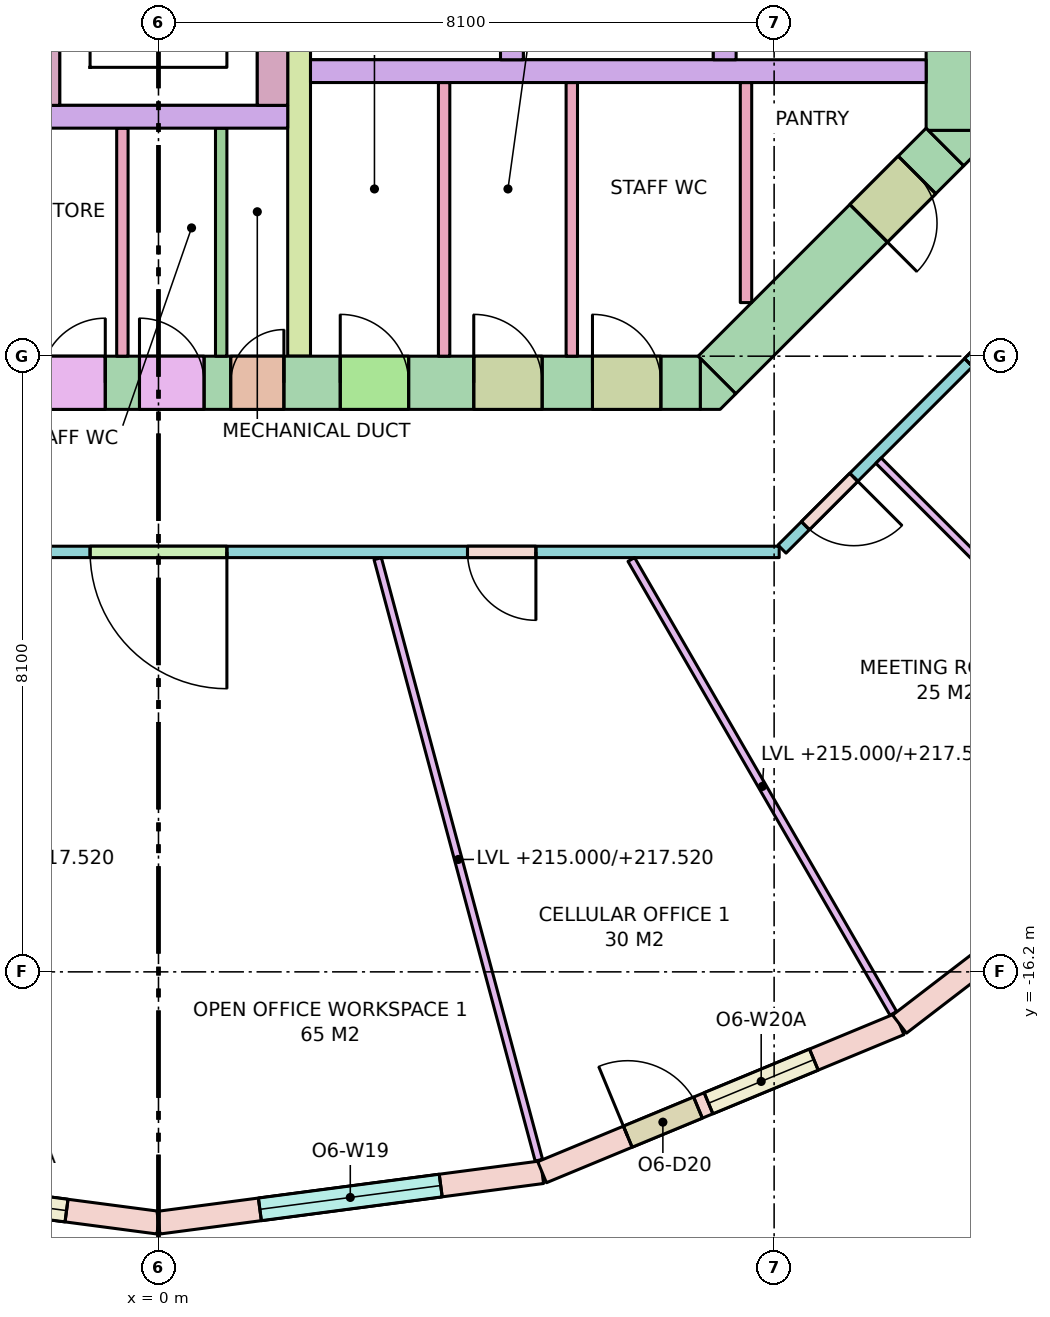
"""IFC4 building model, lengths in metres.
Left out: names, types, materials, properties, quantities, classifications, styles, units other than length and angle.
Written with IfcOpenShell. Run it as: python <this file> out.ifc"""

import sys

from ifc_helpers import new_model, si_unit, direction, frame, frame_2d, origin, place, context, subcontext, project, spatial, polyline, rectangle, outline, extrude, element, fill, save


model = new_model("IFC4")
c1 = context("Model", 3, precision=1e-05, world=origin(), true_north=direction((0.0, 1.0)))
c2 = subcontext(c1, "Body", "Model", "MODEL_VIEW")
j1 = project(units=[si_unit("LENGTHUNIT", "METRE"), si_unit("PLANEANGLEUNIT", "RADIAN")], contexts=[c1])
p1 = place(None, origin())
s1 = spatial("IfcSite", under=j1, at=p1, CompositionType="ELEMENT")
p2 = place(p1, origin())
s2 = spatial("IfcBuilding", under=s1, at=p2, CompositionType="ELEMENT")
p3 = place(p2, frame((0.0, 0.0, 215.0)))
s3 = spatial("IfcBuildingStorey", under=s2, at=p3, CompositionType="ELEMENT", Elevation=215.0)
p4 = place(p3, frame((-7.13, -8.45, -0.28), z_axis=(0.0, 0.0, 1.0), x_axis=(1.0, 0.0, 0.0)))
e1 = element("IfcWall", 1, at=p4, inside=s3, PredefinedType="SHEAR", context=c2, shape_type="SweptSolid", body=[
    extrude(rectangle(XDim=14.26, YDim=0.7, at=frame_2d((7.13, 0.0))), origin(), (0.0, 0.0, 1.0), 3.7),
])
p5 = place(p4, frame((8.08, 0.0, 0.28)))
e2 = element("IfcOpeningElement", 2, at=p5, cuts=e1, PredefinedType="OPENING", context=c2, shape_type="SweptSolid", body=[
    extrude(rectangle(XDim=0.7, YDim=2.1, at=frame_2d((0.35, 1.05))), frame((0.0, 0.36, 0.0), z_axis=(0.0, -1.0, 0.0), x_axis=(1.0, 0.0, 0.0)), (0.0, 0.0, 1.0), 0.72),
])
p6 = place(p4, frame((5.58, 0.0, 0.28)))
e3 = element("IfcOpeningElement", 3, at=p6, cuts=e1, PredefinedType="OPENING", context=c2, shape_type="SweptSolid", body=[
    extrude(rectangle(XDim=0.85, YDim=2.1, at=frame_2d((0.425, 1.05))), frame((0.0, 0.36, 0.0), z_axis=(0.0, -1.0, 0.0), x_axis=(1.0, 0.0, 0.0)), (0.0, 0.0, 1.0), 0.72),
])
p7 = place(p4, frame((6.88, 0.0, 0.28)))
e4 = element("IfcOpeningElement", 4, at=p7, cuts=e1, PredefinedType="OPENING", context=c2, shape_type="SweptSolid", body=[
    extrude(rectangle(XDim=0.85, YDim=2.1, at=frame_2d((0.425, 1.05))), frame((0.0, 0.36, 0.0), z_axis=(0.0, -1.0, 0.0), x_axis=(1.0, 0.0, 0.0)), (0.0, 0.0, 1.0), 0.72),
])
p8 = place(p4, frame((9.521, 0.0, 0.28)))
e5 = element("IfcOpeningElement", 5, at=p8, cuts=e1, PredefinedType="OPENING", context=c2, shape_type="SweptSolid", body=[
    extrude(rectangle(XDim=0.9, YDim=2.1, at=frame_2d((0.45, 1.05))), frame((0.0, 0.36, 0.0), z_axis=(0.0, -1.0, 0.0), x_axis=(1.0, 0.0, 0.0)), (0.0, 0.0, 1.0), 0.72),
])
p9 = place(p4, frame((11.278, 0.0, 0.28)))
e6 = element("IfcOpeningElement", 6, at=p9, cuts=e1, PredefinedType="OPENING", context=c2, shape_type="SweptSolid", body=[
    extrude(rectangle(XDim=0.9, YDim=2.1, at=frame_2d((0.45, 1.05))), frame((0.0, 0.36, 0.0), z_axis=(0.0, -1.0, 0.0), x_axis=(1.0, 0.0, 0.0)), (0.0, 0.0, 1.0), 0.72),
])
p10 = place(p4, frame((12.84, 0.0, 0.28)))
e7 = element("IfcOpeningElement", 7, at=p10, cuts=e1, PredefinedType="OPENING", context=c2, shape_type="SweptSolid", body=[
    extrude(rectangle(XDim=0.9, YDim=2.1, at=frame_2d((0.45, 1.05))), frame((0.0, 0.36, 0.0), z_axis=(0.0, -1.0, 0.0), x_axis=(1.0, 0.0, 0.0)), (0.0, 0.0, 1.0), 0.72),
])
p11 = place(p3, frame((10.45, -5.13, -0.28), z_axis=(0.0, 0.0, 1.0), x_axis=(0.0, 1.0, 0.0)))
e8 = element("IfcWall", 8, at=p11, inside=s3, PredefinedType="SHEAR", context=c2, shape_type="SweptSolid", body=[
    extrude(rectangle(XDim=10.26, YDim=0.7, at=frame_2d((5.13, 0.0))), origin(), (0.0, 0.0, 1.0), 3.7),
])
p12 = place(p11, frame((4.13, 0.0, 0.28)))
e9 = element("IfcOpeningElement", 9, at=p12, cuts=e8, PredefinedType="OPENING", context=c2, shape_type="SweptSolid", body=[
    extrude(rectangle(XDim=2.0, YDim=2.1, at=frame_2d((1.0, 1.05))), frame((0.0, 0.36, 0.0), z_axis=(0.0, -1.0, 0.0), x_axis=(1.0, 0.0, 0.0)), (0.0, 0.0, 1.0), 0.72),
])
p13 = place(p3, frame((10.347, -5.347, -0.28), z_axis=(0.0, 0.0, 1.0), x_axis=(-0.707106781187, -0.707106781187, 0.0)))
e10 = element("IfcWall", 10, at=p13, inside=s3, PredefinedType="SHEAR", context=c2, shape_type="SweptSolid", body=[
    extrude(rectangle(XDim=4.243, YDim=0.7, at=frame_2d((2.121, 0.0))), origin(), (0.0, 0.0, 1.0), 3.7),
])
p14 = place(p13, frame((0.52, 0.0, 0.28)))
e11 = element("IfcOpeningElement", 11, at=p14, cuts=e10, PredefinedType="OPENING", context=c2, shape_type="SweptSolid", body=[
    extrude(rectangle(XDim=0.9, YDim=2.1, at=frame_2d((0.45, 1.05))), frame((0.0, 0.36, 0.0), z_axis=(0.0, -1.0, 0.0), x_axis=(1.0, 0.0, 0.0)), (0.0, 0.0, 1.0), 0.72),
])
p15 = place(p3, frame((0.0, 0.0, -0.28)))
e12 = element("IfcWall", 12, at=p15, inside=s3, PredefinedType="SHEAR", context=c2, shape_type="SweptSolid", body=[
    extrude(outline(polyline([(7.39, -8.8), (7.13, -8.8), (7.13, -8.8), (7.13, -8.13), (7.595, -8.595), (7.595, -8.595), (7.595, -8.595), (7.39, -8.8)])), origin(), (0.0, 0.0, 1.0), 3.7),
])
p16 = place(p3, frame((0.0, 0.0, -0.28)))
e13 = element("IfcWall", 13, at=p16, inside=s3, PredefinedType="SHEAR", context=c2, shape_type="SweptSolid", body=[
    extrude(outline(polyline([(10.8, -5.39), (10.595, -5.595), (10.595, -5.595), (10.595, -5.595), (10.13, -5.13), (10.8, -5.13), (10.8, -5.13), (10.8, -5.39)])), origin(), (0.0, 0.0, 1.0), 3.7),
])
p17 = place(p3, frame((2.0, -4.35, 0.0), z_axis=(0.0, 0.0, 1.0), x_axis=(1.0, 0.0, 0.0)))
e14 = element("IfcWall", 14, at=p17, inside=s3, PredefinedType="SOLIDWALL", context=c2, shape_type="SweptSolid", body=[
    extrude(rectangle(XDim=8.1, YDim=0.3, at=frame_2d((4.05, 0.0))), origin(), (0.0, 0.0, 1.0), 3.42),
])
for number, where, z_axis, x_axis in (
    (15, (4.65, -4.2, 0.0), (0.0, 0.0, 1.0), (0.0, 1.0, 0.0)),
    (16, (7.45, -4.2, 0.0), (0.0, 0.0, 1.0), (0.0, 1.0, 0.0)),
):
    element("IfcWall", number, at=place(p3, frame(where, z_axis=z_axis, x_axis=x_axis)), inside=s3, PredefinedType="SOLIDWALL", context=c2, shape_type="SweptSolid", body=[
        extrude(rectangle(XDim=2.4, YDim=0.3, at=frame_2d((1.2, 0.0))), origin(), (0.0, 0.0, 1.0), 3.42),
    ])
p18 = place(p3, frame((1.85, -8.1, 0.0), z_axis=(0.0, 0.0, 1.0), x_axis=(0.0, 1.0, 0.0)))
e17 = element("IfcWall", 17, at=p18, inside=s3, PredefinedType="SHEAR", context=c2, shape_type="SweptSolid", body=[
    extrude(rectangle(XDim=6.6, YDim=0.3, at=frame_2d((3.3, 0.0))), origin(), (0.0, 0.0, 1.0), 3.42),
])
for number, where, z_axis, x_axis in (
    (18, (-1.5, -4.8, 0.0), (0.0, 0.0, 1.0), (0.0, 1.0, 0.0)),
    (19, (1.5, -4.8, 0.0), (0.0, 0.0, 1.0), (0.0, 1.0, 0.0)),
):
    element("IfcWall", number, at=place(p3, frame(where, z_axis=z_axis, x_axis=x_axis)), inside=s3, PredefinedType="SOLIDWALL", context=c2, shape_type="SweptSolid", body=[
        extrude(rectangle(XDim=3.0, YDim=0.4, at=frame_2d((1.5, 0.0))), origin(), (0.0, 0.0, 1.0), 3.42),
    ])
p19 = place(p3, frame((-1.7, -4.95, 0.0), z_axis=(0.0, 0.0, 1.0), x_axis=(1.0, 0.0, 0.0)))
e20 = element("IfcWall", 20, at=p19, inside=s3, PredefinedType="SOLIDWALL", context=c2, shape_type="SweptSolid", body=[
    extrude(rectangle(XDim=3.4, YDim=0.3, at=frame_2d((1.7, 0.0))), origin(), (0.0, 0.0, 1.0), 3.42),
])
p20 = place(p3, frame((-5.047, -18.836, 0.0), z_axis=(0.0, 0.0, 1.0), x_axis=(0.99144890792, -0.130495451964, 0.0)))
e21 = element("IfcWall", 21, at=p20, inside=s3, PredefinedType="STANDARD", context=c2, shape_type="SweptSolid", body=[
    extrude(rectangle(XDim=5.091, YDim=0.3, at=frame_2d((2.545, 0.0))), origin(), (0.0, 0.0, 1.0), 3.42),
])
p21 = place(p20, frame((1.22, 0.0, 0.0)))
e22 = element("IfcOpeningElement", 22, at=p21, cuts=e21, PredefinedType="OPENING", context=c2, shape_type="SweptSolid", body=[
    extrude(rectangle(XDim=1.0, YDim=2.4, at=frame_2d((0.5, 1.2))), frame((0.0, 0.16, 0.0), z_axis=(0.0, -1.0, 0.0), x_axis=(1.0, 0.0, 0.0)), (0.0, 0.0, 1.0), 0.32),
])
p22 = place(p20, frame((2.37, 0.0, 0.8)))
e23 = element("IfcOpeningElement", 23, at=p22, cuts=e21, PredefinedType="OPENING", context=c2, shape_type="SweptSolid", body=[
    extrude(rectangle(XDim=1.5, YDim=2.4, at=frame_2d((0.75, 1.2))), frame((0.0, 0.16, 0.0), z_axis=(0.0, -1.0, 0.0), x_axis=(1.0, 0.0, 0.0)), (0.0, 0.0, 1.0), 0.32),
])
p23 = place(p3, frame((0.0, -19.5, 0.0), z_axis=(0.0, 0.0, 1.0), x_axis=(0.99144890792, 0.130495451964, 0.0)))
e24 = element("IfcWall", 24, at=p23, inside=s3, PredefinedType="STANDARD", context=c2, shape_type="SweptSolid", body=[
    extrude(rectangle(XDim=5.091, YDim=0.3, at=frame_2d((2.545, 0.0))), origin(), (0.0, 0.0, 1.0), 3.42),
])
p24 = place(p23, frame((1.345, 0.0, 0.8)))
e25 = element("IfcOpeningElement", 25, at=p24, cuts=e24, PredefinedType="OPENING", context=c2, shape_type="SweptSolid", body=[
    extrude(rectangle(XDim=2.4, YDim=2.4, at=frame_2d((1.2, 1.2))), frame((0.0, 0.16, 0.0), z_axis=(0.0, -1.0, 0.0), x_axis=(1.0, 0.0, 0.0)), (0.0, 0.0, 1.0), 0.32),
])
p25 = place(p3, frame((5.047, -18.836, 0.0), z_axis=(0.0, 0.0, 1.0), x_axis=(0.923862504675, 0.382724538613, 0.0)))
e26 = element("IfcWall", 26, at=p25, inside=s3, PredefinedType="STANDARD", context=c2, shape_type="SweptSolid", body=[
    extrude(rectangle(XDim=5.091, YDim=0.3, at=frame_2d((2.545, 0.0))), origin(), (0.0, 0.0, 1.0), 3.42),
])
p26 = place(p25, frame((1.22, 0.0, 0.0)))
e27 = element("IfcOpeningElement", 27, at=p26, cuts=e26, PredefinedType="OPENING", context=c2, shape_type="SweptSolid", body=[
    extrude(rectangle(XDim=1.0, YDim=2.4, at=frame_2d((0.5, 1.2))), frame((0.0, 0.16, 0.0), z_axis=(0.0, -1.0, 0.0), x_axis=(1.0, 0.0, 0.0)), (0.0, 0.0, 1.0), 0.32),
])
p27 = place(p25, frame((2.37, 0.0, 0.8)))
e28 = element("IfcOpeningElement", 28, at=p27, cuts=e26, PredefinedType="OPENING", context=c2, shape_type="SweptSolid", body=[
    extrude(rectangle(XDim=1.5, YDim=2.4, at=frame_2d((0.75, 1.2))), frame((0.0, 0.16, 0.0), z_axis=(0.0, -1.0, 0.0), x_axis=(1.0, 0.0, 0.0)), (0.0, 0.0, 1.0), 0.32),
])
p28 = place(p3, frame((9.75, -16.887, 0.0), z_axis=(0.0, 0.0, 1.0), x_axis=(0.79335619014, 0.608757714995, 0.0)))
e29 = element("IfcWall", 29, at=p28, inside=s3, PredefinedType="STANDARD", context=c2, shape_type="SweptSolid", body=[
    extrude(rectangle(XDim=5.091, YDim=0.3, at=frame_2d((2.545, 0.0))), origin(), (0.0, 0.0, 1.0), 3.42),
])
p29 = place(p28, frame((1.345, 0.0, 0.8)))
e30 = element("IfcOpeningElement", 30, at=p29, cuts=e29, PredefinedType="OPENING", context=c2, shape_type="SweptSolid", body=[
    extrude(rectangle(XDim=2.4, YDim=2.4, at=frame_2d((1.2, 1.2))), frame((0.0, 0.16, 0.0), z_axis=(0.0, -1.0, 0.0), x_axis=(1.0, 0.0, 0.0)), (0.0, 0.0, 1.0), 0.32),
])
for number, where, z_axis, x_axis in (
    (31, (0.825, -8.1, 0.0), (0.0, 0.0, 1.0), (0.0, 1.0, 0.0)),
    (32, (-0.475, -8.1, 0.0), (0.0, 0.0, 1.0), (0.0, 1.0, 0.0)),
):
    element("IfcWall", number, at=place(p3, frame(where, z_axis=z_axis, x_axis=x_axis)), inside=s3, PredefinedType="PARTITIONING", context=c2, shape_type="SweptSolid", body=[
        extrude(rectangle(XDim=3.0, YDim=0.15, at=frame_2d((1.5, 0.0))), origin(), (0.0, 0.0, 1.0), 3.42),
    ])
for number, where, z_axis, x_axis in (
    (33, (3.758, -8.1, 0.0), (0.0, 0.0, 1.0), (0.0, 1.0, 0.0)),
    (34, (5.438, -8.1, 0.0), (0.0, 0.0, 1.0), (0.0, 1.0, 0.0)),
):
    element("IfcWall", number, at=place(p3, frame(where, z_axis=z_axis, x_axis=x_axis)), inside=s3, PredefinedType="PARTITIONING", context=c2, shape_type="SweptSolid", body=[
        extrude(rectangle(XDim=3.6, YDim=0.15, at=frame_2d((1.8, 0.0))), origin(), (0.0, 0.0, 1.0), 3.42),
    ])
p30 = place(p3, frame((7.73, -7.395, 0.0), z_axis=(0.0, 0.0, 1.0), x_axis=(0.0, 1.0, 0.0)))
e35 = element("IfcWall", 35, at=p30, inside=s3, PredefinedType="PARTITIONING", context=c2, shape_type="SweptSolid", body=[
    extrude(rectangle(XDim=2.895, YDim=0.15, at=frame_2d((1.448, 0.0))), origin(), (0.0, 0.0, 1.0), 3.42),
])
p31 = place(p3, frame((12.638, -6.204, 0.0), z_axis=(0.0, 0.0, 1.0), x_axis=(-0.707106781187, -0.707106781187, 0.0)))
e36 = element("IfcWall", 36, at=p31, inside=s3, PredefinedType="PARTITIONING", context=c2, shape_type="SweptSolid", body=[
    extrude(rectangle(XDim=6.271, YDim=0.15, at=frame_2d((3.135, 0.0))), origin(), (0.0, 0.0, 1.0), 2.52),
])
p32 = place(p31, frame((4.935, 0.0, 0.0)))
e37 = element("IfcOpeningElement", 37, at=p32, cuts=e36, PredefinedType="OPENING", context=c2, shape_type="SweptSolid", body=[
    extrude(rectangle(XDim=0.9, YDim=2.1, at=frame_2d((0.45, 1.05))), frame((0.0, 0.085, 0.0), z_axis=(0.0, -1.0, 0.0), x_axis=(1.0, 0.0, 0.0)), (0.0, 0.0, 1.0), 0.17),
])
p33 = place(p31, frame((1.8, 0.0, 0.0)))
e38 = element("IfcOpeningElement", 38, at=p33, cuts=e36, PredefinedType="OPENING", context=c2, shape_type="SweptSolid", body=[
    extrude(rectangle(XDim=1.0, YDim=2.1, at=frame_2d((0.5, 1.05))), frame((0.0, 0.085, 0.0), z_axis=(0.0, -1.0, 0.0), x_axis=(1.0, 0.0, 0.0)), (0.0, 0.0, 1.0), 0.17),
])
p34 = place(p3, frame((8.167, -10.675, 0.0), z_axis=(0.0, 0.0, 1.0), x_axis=(-1.0, 0.0, 0.0)))
e39 = element("IfcWall", 39, at=p34, inside=s3, PredefinedType="PARTITIONING", context=c2, shape_type="SweptSolid", body=[
    extrude(rectangle(XDim=14.33, YDim=0.15, at=frame_2d((7.165, 0.0))), origin(), (0.0, 0.0, 1.0), 2.52),
])
p35 = place(p34, frame((7.267, 0.0, 0.0)))
e40 = element("IfcOpeningElement", 40, at=p35, cuts=e39, PredefinedType="OPENING", context=c2, shape_type="SweptSolid", body=[
    extrude(rectangle(XDim=1.8, YDim=2.1, at=frame_2d((0.9, 1.05))), frame((0.0, 0.085, 0.0), z_axis=(0.0, -1.0, 0.0), x_axis=(1.0, 0.0, 0.0)), (0.0, 0.0, 1.0), 0.17),
])
p36 = place(p34, frame((3.201, 0.0, 0.0)))
e41 = element("IfcOpeningElement", 41, at=p36, cuts=e39, PredefinedType="OPENING", context=c2, shape_type="SweptSolid", body=[
    extrude(rectangle(XDim=0.9, YDim=2.1, at=frame_2d((0.45, 1.05))), frame((0.0, 0.085, 0.0), z_axis=(0.0, -1.0, 0.0), x_axis=(1.0, 0.0, 0.0)), (0.0, 0.0, 1.0), 0.17),
])
p37 = place(p34, frame((11.753, 0.0, 0.0)))
e42 = element("IfcOpeningElement", 42, at=p37, cuts=e39, PredefinedType="OPENING", context=c2, shape_type="SweptSolid", body=[
    extrude(rectangle(XDim=1.8, YDim=2.1, at=frame_2d((0.9, 1.05))), frame((0.0, 0.085, 0.0), z_axis=(0.0, -1.0, 0.0), x_axis=(1.0, 0.0, 0.0)), (0.0, 0.0, 1.0), 0.17),
])
p38 = place(p3, frame((2.884, -10.764, 0.0), z_axis=(0.0, 0.0, 1.0), x_axis=(0.258818011497, -0.965926103242, 0.0)))
e43 = element("IfcWall", 43, at=p38, inside=s3, PredefinedType="PARTITIONING", context=c2, shape_type="SweptSolid", body=[
    extrude(rectangle(XDim=8.192, YDim=0.1, at=frame_2d((4.096, 0.0))), origin(), (0.0, 0.0, 1.0), 2.52),
])
p39 = place(p3, frame((6.221, -10.775, 0.0), z_axis=(0.0, 0.0, 1.0), x_axis=(0.500015661236, -0.866016361577, 0.0)))
e44 = element("IfcWall", 44, at=p39, inside=s3, PredefinedType="PARTITIONING", context=c2, shape_type="SweptSolid", body=[
    extrude(rectangle(XDim=6.895, YDim=0.1, at=frame_2d((3.448, 0.0))), origin(), (0.0, 0.0, 1.0), 2.52),
])
p40 = place(p3, frame((9.474, -9.474, 0.0), z_axis=(0.0, 0.0, 1.0), x_axis=(0.707106781187, -0.707106781187, 0.0)))
e45 = element("IfcWall", 45, at=p40, inside=s3, PredefinedType="PARTITIONING", context=c2, shape_type="SweptSolid", body=[
    extrude(rectangle(XDim=5.938, YDim=0.1, at=frame_2d((2.969, 0.0))), origin(), (0.0, 0.0, 1.0), 2.52),
])
p41 = place(p22, origin())
e46 = element("IfcWindow", 46, at=p41, inside=s3, PartitioningType="SINGLE_PANEL", PredefinedType="WINDOW", context=c2, shape_type="SweptSolid", body=[
    extrude(rectangle(XDim=1.5, YDim=2.4, at=frame_2d((0.75, 1.2))), frame((0.0, 0.03, 0.0), z_axis=(0.0, -1.0, 0.0), x_axis=(1.0, 0.0, 0.0)), (0.0, 0.0, 1.0), 0.06),
])
fill(e23, e46)
p42 = place(p24, origin())
e47 = element("IfcWindow", 47, at=p42, inside=s3, PartitioningType="SINGLE_PANEL", PredefinedType="WINDOW", context=c2, shape_type="SweptSolid", body=[
    extrude(rectangle(XDim=2.4, YDim=2.4, at=frame_2d((1.2, 1.2))), frame((0.0, 0.03, 0.0), z_axis=(0.0, -1.0, 0.0), x_axis=(1.0, 0.0, 0.0)), (0.0, 0.0, 1.0), 0.06),
])
fill(e25, e47)
p43 = place(p26, origin())
e48 = element("IfcDoor", 48, at=p43, inside=s3, OperationType="SINGLE_SWING_LEFT", PredefinedType="DOOR", context=c2, shape_type="SweptSolid", body=[
    extrude(rectangle(XDim=1.0, YDim=2.4, at=frame_2d((0.5, 1.2))), frame((0.0, 0.025, 0.0), z_axis=(0.0, -1.0, 0.0), x_axis=(1.0, 0.0, 0.0)), (0.0, 0.0, 1.0), 0.05),
])
fill(e27, e48)
p44 = place(p27, origin())
e49 = element("IfcWindow", 49, at=p44, inside=s3, PartitioningType="SINGLE_PANEL", PredefinedType="WINDOW", context=c2, shape_type="SweptSolid", body=[
    extrude(rectangle(XDim=1.5, YDim=2.4, at=frame_2d((0.75, 1.2))), frame((0.0, 0.03, 0.0), z_axis=(0.0, -1.0, 0.0), x_axis=(1.0, 0.0, 0.0)), (0.0, 0.0, 1.0), 0.06),
])
fill(e28, e49)
p45 = place(p5, origin())
e50 = element("IfcDoor", 50, at=p45, inside=s3, OperationType="SINGLE_SWING_RIGHT", PredefinedType="DOOR", context=c2, shape_type="SweptSolid", body=[
    extrude(rectangle(XDim=0.7, YDim=2.1, at=frame_2d((0.35, 1.05))), frame((0.0, 0.025, 0.0), z_axis=(0.0, -1.0, 0.0), x_axis=(1.0, 0.0, 0.0)), (0.0, 0.0, 1.0), 0.05),
])
fill(e2, e50)
p46 = place(p6, origin())
e51 = element("IfcDoor", 51, at=p46, inside=s3, OperationType="SINGLE_SWING_RIGHT", PredefinedType="DOOR", context=c2, shape_type="SweptSolid", body=[
    extrude(rectangle(XDim=0.85, YDim=2.1, at=frame_2d((0.425, 1.05))), frame((0.0, 0.025, 0.0), z_axis=(0.0, -1.0, 0.0), x_axis=(1.0, 0.0, 0.0)), (0.0, 0.0, 1.0), 0.05),
])
fill(e3, e51)
p47 = place(p7, origin())
e52 = element("IfcDoor", 52, at=p47, inside=s3, OperationType="SINGLE_SWING_LEFT", PredefinedType="DOOR", context=c2, shape_type="SweptSolid", body=[
    extrude(rectangle(XDim=0.85, YDim=2.1, at=frame_2d((0.425, 1.05))), frame((0.0, 0.025, 0.0), z_axis=(0.0, -1.0, 0.0), x_axis=(1.0, 0.0, 0.0)), (0.0, 0.0, 1.0), 0.05),
])
fill(e4, e52)
p48 = place(p8, origin())
e53 = element("IfcDoor", 53, at=p48, inside=s3, OperationType="SINGLE_SWING_LEFT", PredefinedType="DOOR", context=c2, shape_type="SweptSolid", body=[
    extrude(rectangle(XDim=0.9, YDim=2.1, at=frame_2d((0.45, 1.05))), frame((0.0, 0.025, 0.0), z_axis=(0.0, -1.0, 0.0), x_axis=(1.0, 0.0, 0.0)), (0.0, 0.0, 1.0), 0.05),
])
fill(e5, e53)
p49 = place(p9, origin())
e54 = element("IfcDoor", 54, at=p49, inside=s3, OperationType="SINGLE_SWING_LEFT", PredefinedType="DOOR", context=c2, shape_type="SweptSolid", body=[
    extrude(rectangle(XDim=0.9, YDim=2.1, at=frame_2d((0.45, 1.05))), frame((0.0, 0.025, 0.0), z_axis=(0.0, -1.0, 0.0), x_axis=(1.0, 0.0, 0.0)), (0.0, 0.0, 1.0), 0.05),
])
fill(e6, e54)
p50 = place(p10, origin())
e55 = element("IfcDoor", 55, at=p50, inside=s3, OperationType="SINGLE_SWING_LEFT", PredefinedType="DOOR", context=c2, shape_type="SweptSolid", body=[
    extrude(rectangle(XDim=0.9, YDim=2.1, at=frame_2d((0.45, 1.05))), frame((0.0, 0.025, 0.0), z_axis=(0.0, -1.0, 0.0), x_axis=(1.0, 0.0, 0.0)), (0.0, 0.0, 1.0), 0.05),
])
fill(e7, e55)
p51 = place(p14, origin())
e56 = element("IfcDoor", 56, at=p51, inside=s3, OperationType="SINGLE_SWING_RIGHT", PredefinedType="DOOR", context=c2, shape_type="SweptSolid", body=[
    extrude(rectangle(XDim=0.9, YDim=2.1, at=frame_2d((0.45, 1.05))), frame((0.0, 0.025, 0.0), z_axis=(0.0, -1.0, 0.0), x_axis=(1.0, 0.0, 0.0)), (0.0, 0.0, 1.0), 0.05),
])
fill(e11, e56)
p52 = place(p35, origin())
e57 = element("IfcDoor", 57, at=p52, inside=s3, OperationType="DOUBLE_DOOR_SINGLE_SWING", PredefinedType="DOOR", context=c2, shape_type="SweptSolid", body=[
    extrude(rectangle(XDim=1.8, YDim=2.1, at=frame_2d((0.9, 1.05))), frame((0.0, 0.025, 0.0), z_axis=(0.0, -1.0, 0.0), x_axis=(1.0, 0.0, 0.0)), (0.0, 0.0, 1.0), 0.05),
])
fill(e40, e57)
p53 = place(p36, origin())
e58 = element("IfcDoor", 58, at=p53, inside=s3, OperationType="SINGLE_SWING_LEFT", PredefinedType="DOOR", context=c2, shape_type="SweptSolid", body=[
    extrude(rectangle(XDim=0.9, YDim=2.1, at=frame_2d((0.45, 1.05))), frame((0.0, 0.025, 0.0), z_axis=(0.0, -1.0, 0.0), x_axis=(1.0, 0.0, 0.0)), (0.0, 0.0, 1.0), 0.05),
])
fill(e41, e58)
p54 = place(p32, origin())
e59 = element("IfcDoor", 59, at=p54, inside=s3, OperationType="SINGLE_SWING_LEFT", PredefinedType="DOOR", context=c2, shape_type="SweptSolid", body=[
    extrude(rectangle(XDim=0.9, YDim=2.1, at=frame_2d((0.45, 1.05))), frame((0.0, 0.025, 0.0), z_axis=(0.0, -1.0, 0.0), x_axis=(1.0, 0.0, 0.0)), (0.0, 0.0, 1.0), 0.05),
])
fill(e37, e59)
p55 = place(p33, origin())
e60 = element("IfcDoor", 60, at=p55, inside=s3, OperationType="SINGLE_SWING_RIGHT", PredefinedType="DOOR", context=c2, shape_type="SweptSolid", body=[
    extrude(rectangle(XDim=1.0, YDim=2.1, at=frame_2d((0.5, 1.05))), frame((0.0, 0.025, 0.0), z_axis=(0.0, -1.0, 0.0), x_axis=(1.0, 0.0, 0.0)), (0.0, 0.0, 1.0), 0.05),
])
fill(e38, e60)
save(model, sys.argv[1])
